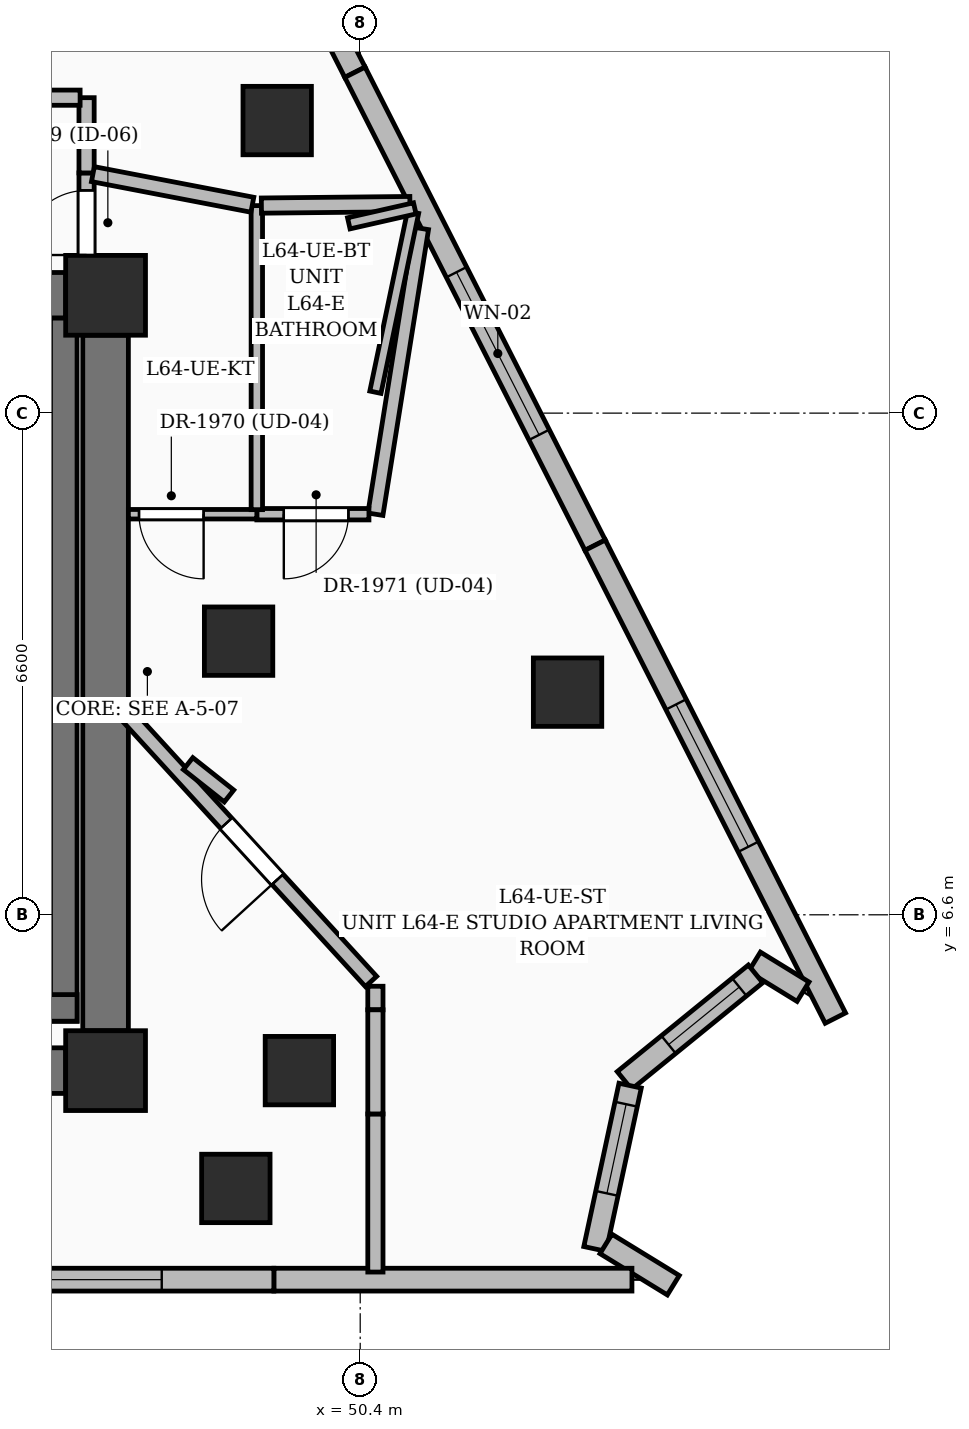
"""IFC4 building model, lengths in metres.
Left out: names, types, materials, properties, quantities, classifications, styles, units other than length and angle.
Written with IfcOpenShell. Run it as: python <this file> out.ifc"""

import sys

from ifc_helpers import new_model, si_unit, direction, frame, frame_2d, origin, origin_2d, place, context, subcontext, project, spatial, rectangle, extrude, element, fill, save


model = new_model("IFC4")
c1 = context("Model", 3, precision=1e-05, world=origin(), true_north=direction((0.0, 1.0)))
c2 = subcontext(c1, "Body", "Model", "MODEL_VIEW")
j1 = project(units=[si_unit("LENGTHUNIT", "METRE"), si_unit("PLANEANGLEUNIT", "RADIAN")], contexts=[c1])
p1 = place(None, origin())
s1 = spatial("IfcSite", under=j1, at=p1, CompositionType="ELEMENT")
p2 = place(p1, origin())
s2 = spatial("IfcBuilding", under=s1, at=p2, CompositionType="ELEMENT")
p3 = place(p2, frame((0.0, 0.0, 248.25)))
s3 = spatial("IfcBuildingStorey", under=s2, at=p3, CompositionType="ELEMENT", Elevation=248.25)
for number, where, z_axis, x_axis in (
    (1, (47.05, 4.55, 0.0), (0.0, 0.0, 1.0), (1.0, 0.0, 0.0)),
    (2, (47.05, 14.75, 0.0), (0.0, 0.0, 1.0), (1.0, 0.0, 0.0)),
):
    element("IfcColumn", number, at=place(p3, frame(where, z_axis=z_axis, x_axis=x_axis)), inside=s3, PredefinedType="COLUMN", context=c2, shape_type="SweptSolid", body=[
        extrude(rectangle(XDim=1.05, YDim=1.05, at=origin_2d()), origin(), (0.0, 0.0, 1.0), 3.75),
    ])
for number, where, z_axis, x_axis in (
    (3, (49.6, 4.55, 0.0), (0.0, 0.0, 1.0), (1.0, 0.0, 0.0)),
    (4, (48.8, 10.2, 0.0), (0.0, 0.0, 1.0), (1.0, 0.0, 0.0)),
):
    element("IfcColumn", number, at=place(p3, frame(where, z_axis=z_axis, x_axis=x_axis)), inside=s3, PredefinedType="COLUMN", context=c2, shape_type="SweptSolid", body=[
        extrude(rectangle(XDim=0.9, YDim=0.9, at=origin_2d()), origin(), (0.0, 0.0, 1.0), 3.75),
    ])
p4 = place(p3, frame((35.675, 4.55, 0.0), z_axis=(0.0, 0.0, 1.0), x_axis=(1.0, 0.0, 0.0)))
e5 = element("IfcWall", 5, at=p4, inside=s3, PredefinedType="SHEAR", context=c2, shape_type="SweptSolid", body=[
    extrude(rectangle(XDim=10.85, YDim=0.6, at=frame_2d((5.425, 0.0))), origin(), (0.0, 0.0, 1.0), 3.75),
])
p5 = place(p3, frame((35.675, 14.75, 0.0), z_axis=(0.0, 0.0, 1.0), x_axis=(1.0, 0.0, 0.0)))
e6 = element("IfcWall", 6, at=p5, inside=s3, PredefinedType="SHEAR", context=c2, shape_type="SweptSolid", body=[
    extrude(rectangle(XDim=10.85, YDim=0.6, at=frame_2d((5.425, 0.0))), origin(), (0.0, 0.0, 1.0), 3.75),
])
p6 = place(p5, frame((1.1, 0.0, 0.0)))
e7 = element("IfcOpeningElement", 7, at=p6, cuts=e6, PredefinedType="OPENING", context=c2, shape_type="SweptSolid", body=[
    extrude(rectangle(XDim=1.05, YDim=2.15, at=frame_2d((0.525, 1.075))), frame((0.0, 0.31, 0.0), z_axis=(0.0, -1.0, 0.0), x_axis=(1.0, 0.0, 0.0)), (0.0, 0.0, 1.0), 0.62),
])
p7 = place(p5, frame((8.7, 0.0, 0.0)))
e8 = element("IfcOpeningElement", 8, at=p7, cuts=e6, PredefinedType="OPENING", context=c2, shape_type="SweptSolid", body=[
    extrude(rectangle(XDim=1.05, YDim=2.15, at=frame_2d((0.525, 1.075))), frame((0.0, 0.31, 0.0), z_axis=(0.0, -1.0, 0.0), x_axis=(1.0, 0.0, 0.0)), (0.0, 0.0, 1.0), 0.62),
])
p8 = place(p5, frame((3.825, 0.0, 0.0)))
e9 = element("IfcOpeningElement", 9, at=p8, cuts=e6, PredefinedType="OPENING", context=c2, shape_type="SweptSolid", body=[
    extrude(rectangle(XDim=1.2, YDim=2.2, at=frame_2d((0.6, 1.1))), frame((0.0, 0.31, 0.0), z_axis=(0.0, -1.0, 0.0), x_axis=(1.0, 0.0, 0.0)), (0.0, 0.0, 1.0), 0.62),
])
p9 = place(p5, frame((5.825, 0.0, 0.0)))
e10 = element("IfcOpeningElement", 10, at=p9, cuts=e6, PredefinedType="OPENING", context=c2, shape_type="SweptSolid", body=[
    extrude(rectangle(XDim=1.2, YDim=2.2, at=frame_2d((0.6, 1.1))), frame((0.0, 0.31, 0.0), z_axis=(0.0, -1.0, 0.0), x_axis=(1.0, 0.0, 0.0)), (0.0, 0.0, 1.0), 0.62),
])
p10 = place(p3, frame((47.05, 5.075, 0.0), z_axis=(0.0, 0.0, 1.0), x_axis=(0.0, 1.0, 0.0)))
e11 = element("IfcWall", 11, at=p10, inside=s3, PredefinedType="SHEAR", context=c2, shape_type="SweptSolid", body=[
    extrude(rectangle(XDim=9.15, YDim=0.6, at=frame_2d((4.575, 0.0))), origin(), (0.0, 0.0, 1.0), 3.75),
])
p11 = place(p3, frame((46.5, 5.2, 0.0), z_axis=(0.0, 0.0, 1.0), x_axis=(0.0, 1.0, 0.0)))
e12 = element("IfcWall", 12, at=p11, inside=s3, PredefinedType="SOLIDWALL", context=c2, shape_type="SweptSolid", body=[
    extrude(rectangle(XDim=9.25, YDim=0.35, at=frame_2d((4.625, 0.0))), origin(), (0.0, 0.0, 1.0), 3.75),
])
p12 = place(p3, frame((43.125, 5.375, 0.0), z_axis=(0.0, 0.0, 1.0), x_axis=(1.0, 0.0, 0.0)))
e13 = element("IfcWall", 13, at=p12, inside=s3, PredefinedType="SOLIDWALL", context=c2, shape_type="SweptSolid", body=[
    extrude(rectangle(XDim=3.55, YDim=0.35, at=frame_2d((1.775, 0.0))), origin(), (0.0, 0.0, 1.0), 3.75),
])
for number, where, z_axis, x_axis in (
    (14, (48.764, 3.0, 0.0), (0.0, 0.0, 1.0), (1.0, 0.0, 0.0)),
    (15, (53.128, 9.529, 0.0), (0.0, 0.0, 1.0), (1.0, 0.0, 0.0)),
    (16, (49.308, 17.049, 0.0), (0.0, 0.0, 1.0), (1.0, 0.0, 0.0)),
):
    element("IfcColumn", number, at=place(p3, frame(where, z_axis=z_axis, x_axis=x_axis)), inside=s3, PredefinedType="COLUMN", context=c2, shape_type="SweptSolid", body=[
        extrude(rectangle(XDim=0.9, YDim=0.9, at=origin_2d()), origin(), (0.0, 0.0, 1.0), 3.75),
    ])
p13 = place(p3, frame((47.297, 23.656, 0.0), z_axis=(0.0, 0.0, 1.0), x_axis=(0.452876034441, -0.891573495248, 0.0)))
e17 = element("IfcWall", 17, at=p13, inside=s3, PredefinedType="SOLIDWALL", context=c2, shape_type="SweptSolid", body=[
    extrude(rectangle(XDim=6.698, YDim=0.3, at=frame_2d((3.349, 0.0))), origin(), (0.0, 0.0, 1.0), 3.5),
])
p14 = place(p13, frame((2.645, 0.0, 0.8)))
e18 = element("IfcOpeningElement", 18, at=p14, cuts=e17, PredefinedType="OPENING", context=c2, shape_type="SweptSolid", body=[
    extrude(rectangle(XDim=1.2, YDim=1.8, at=frame_2d((0.6, 0.9))), frame((0.0, 0.16, 0.0), z_axis=(0.0, -1.0, 0.0), x_axis=(1.0, 0.0, 0.0)), (0.0, 0.0, 1.0), 0.32),
])
p15 = place(p3, frame((50.331, 17.684, 0.0), z_axis=(0.0, 0.0, 1.0), x_axis=(0.452886204096, -0.891568329484, 0.0)))
e19 = element("IfcWall", 19, at=p15, inside=s3, PredefinedType="SOLIDWALL", context=c2, shape_type="SweptSolid", body=[
    extrude(rectangle(XDim=6.978, YDim=0.3, at=frame_2d((3.489, 0.0))), origin(), (0.0, 0.0, 1.0), 3.5),
])
p16 = place(p15, frame((2.95, 0.0, 0.6)))
e20 = element("IfcOpeningElement", 20, at=p16, cuts=e19, PredefinedType="OPENING", context=c2, shape_type="SweptSolid", body=[
    extrude(rectangle(XDim=2.4, YDim=2.1, at=frame_2d((1.2, 1.05))), frame((0.0, 0.16, 0.0), z_axis=(0.0, -1.0, 0.0), x_axis=(1.0, 0.0, 0.0)), (0.0, 0.0, 1.0), 0.32),
])
p17 = place(p3, frame((53.491, 11.463, 0.0), z_axis=(0.0, 0.0, 1.0), x_axis=(0.452872520075, -0.891575280367, 0.0)))
e21 = element("IfcWall", 21, at=p17, inside=s3, PredefinedType="SOLIDWALL", context=c2, shape_type="SweptSolid", body=[
    extrude(rectangle(XDim=6.978, YDim=0.3, at=frame_2d((3.489, 0.0))), origin(), (0.0, 0.0, 1.0), 3.5),
])
p18 = place(p17, frame((2.35, 0.0, 0.55)))
e22 = element("IfcOpeningElement", 22, at=p18, cuts=e21, PredefinedType="OPENING", context=c2, shape_type="SweptSolid", body=[
    extrude(rectangle(XDim=2.1, YDim=2.4, at=frame_2d((1.05, 1.2))), frame((0.0, 0.16, 0.0), z_axis=(0.0, -1.0, 0.0), x_axis=(1.0, 0.0, 0.0)), (0.0, 0.0, 1.0), 0.32),
])
p19 = place(p3, frame((56.226, 5.588, 0.0), z_axis=(0.0, 0.0, 1.0), x_axis=(-0.851959856167, 0.523607107935, 0.0)))
e23 = element("IfcWall", 23, at=p19, inside=s3, PredefinedType="SOLIDWALL", context=c2, shape_type="SweptSolid", body=[
    extrude(rectangle(XDim=0.75, YDim=0.3, at=frame_2d((0.375, 0.0))), origin(), (0.0, 0.0, 1.0), 3.5),
])
p20 = place(p3, frame((55.601, 5.823, 0.0), z_axis=(0.0, 0.0, 1.0), x_axis=(-0.775969517168, -0.630770408648, 0.0)))
e24 = element("IfcWall", 24, at=p20, inside=s3, PredefinedType="SOLIDWALL", context=c2, shape_type="SweptSolid", body=[
    extrude(rectangle(XDim=2.223, YDim=0.3, at=frame_2d((1.111, 0.0))), origin(), (0.0, 0.0, 1.0), 3.5),
])
p21 = place(p20, frame((0.275, 0.0, 0.8)))
e25 = element("IfcOpeningElement", 25, at=p21, cuts=e24, PredefinedType="OPENING", context=c2, shape_type="SweptSolid", body=[
    extrude(rectangle(XDim=1.2, YDim=1.8, at=frame_2d((0.6, 0.9))), frame((0.0, 0.16, 0.0), z_axis=(0.0, -1.0, 0.0), x_axis=(1.0, 0.0, 0.0)), (0.0, 0.0, 1.0), 0.32),
])
p22 = place(p3, frame((53.951, 4.353, 0.0), z_axis=(0.0, 0.0, 1.0), x_axis=(-0.210621406129, -0.977567707773, 0.0)))
e26 = element("IfcWall", 26, at=p22, inside=s3, PredefinedType="SOLIDWALL", context=c2, shape_type="SweptSolid", body=[
    extrude(rectangle(XDim=2.198, YDim=0.3, at=frame_2d((1.099, 0.0))), origin(), (0.0, 0.0, 1.0), 3.5),
])
p23 = place(p22, frame((0.25, 0.0, 0.8)))
e27 = element("IfcOpeningElement", 27, at=p23, cuts=e26, PredefinedType="OPENING", context=c2, shape_type="SweptSolid", body=[
    extrude(rectangle(XDim=1.2, YDim=1.8, at=frame_2d((0.6, 0.9))), frame((0.0, 0.16, 0.0), z_axis=(0.0, -1.0, 0.0), x_axis=(1.0, 0.0, 0.0)), (0.0, 0.0, 1.0), 0.32),
])
p24 = place(p3, frame((53.633, 2.271, 0.0), z_axis=(0.0, 0.0, 1.0), x_axis=(0.852375061926, -0.522930926421, 0.0)))
e28 = element("IfcWall", 28, at=p24, inside=s3, PredefinedType="SOLIDWALL", context=c2, shape_type="SweptSolid", body=[
    extrude(rectangle(XDim=1.04, YDim=0.3, at=frame_2d((0.52, 0.0))), origin(), (0.0, 0.0, 1.0), 3.5),
])
p25 = place(p3, frame((53.975, 1.8, 0.0), z_axis=(0.0, 0.0, 1.0), x_axis=(-1.0, 0.0, 0.0)))
e29 = element("IfcWall", 29, at=p25, inside=s3, PredefinedType="SOLIDWALL", context=c2, shape_type="SweptSolid", body=[
    extrude(rectangle(XDim=4.711, YDim=0.3, at=frame_2d((2.355, 0.0))), origin(), (0.0, 0.0, 1.0), 3.5),
])
p26 = place(p3, frame((49.264, 1.8, 0.0), z_axis=(0.0, 0.0, 1.0), x_axis=(-1.0, 0.0, 0.0)))
e30 = element("IfcWall", 30, at=p26, inside=s3, PredefinedType="SOLIDWALL", context=c2, shape_type="SweptSolid", body=[
    extrude(rectangle(XDim=5.276, YDim=0.3, at=frame_2d((2.638, 0.0))), origin(), (0.0, 0.0, 1.0), 3.5),
])
p27 = place(p26, frame((1.475, 0.0, 0.55)))
e31 = element("IfcOpeningElement", 31, at=p27, cuts=e30, PredefinedType="OPENING", context=c2, shape_type="SweptSolid", body=[
    extrude(rectangle(XDim=2.1, YDim=2.4, at=frame_2d((1.05, 1.2))), frame((0.0, 0.16, 0.0), z_axis=(0.0, -1.0, 0.0), x_axis=(1.0, 0.0, 0.0)), (0.0, 0.0, 1.0), 0.32),
])
p28 = place(p3, frame((46.8, 15.05, 0.0), z_axis=(0.0, 0.0, 1.0), x_axis=(0.0, 1.0, 0.0)))
e32 = element("IfcWall", 32, at=p28, inside=s3, PredefinedType="PARTITIONING", context=c2, shape_type="SweptSolid", body=[
    extrude(rectangle(XDim=1.31, YDim=0.2, at=frame_2d((0.655, 0.0))), origin(), (0.0, 0.0, 1.0), 2.685),
])
p29 = place(p28, frame((0.23, 0.0, 0.0)))
e33 = element("IfcOpeningElement", 33, at=p29, cuts=e32, PredefinedType="OPENING", context=c2, shape_type="SweptSolid", body=[
    extrude(rectangle(XDim=0.85, YDim=2.1, at=frame_2d((0.425, 1.05))), frame((0.0, 0.11, 0.0), z_axis=(0.0, -1.0, 0.0), x_axis=(1.0, 0.0, 0.0)), (0.0, 0.0, 1.0), 0.22),
])
p30 = place(p3, frame((46.8, 16.36, 0.0), z_axis=(0.0, 0.0, 1.0), x_axis=(0.0, 1.0, 0.0)))
e34 = element("IfcWall", 34, at=p30, inside=s3, PredefinedType="PARTITIONING", context=c2, shape_type="SweptSolid", body=[
    extrude(rectangle(XDim=0.99, YDim=0.2, at=frame_2d((0.495, 0.0))), origin(), (0.0, 0.0, 1.0), 3.5),
])
p31 = place(p3, frame((46.715, 17.35, 0.0), z_axis=(0.0, 0.0, 1.0), x_axis=(-1.0, 0.0, 0.0)))
e35 = element("IfcWall", 35, at=p31, inside=s3, PredefinedType="PARTITIONING", context=c2, shape_type="SweptSolid", body=[
    extrude(rectangle(XDim=5.105, YDim=0.2, at=frame_2d((2.552, 0.0))), origin(), (0.0, 0.0, 1.0), 2.685),
])
p32 = place(p31, frame((1.951, 0.0, 0.0)))
e36 = element("IfcOpeningElement", 36, at=p32, cuts=e35, PredefinedType="OPENING", context=c2, shape_type="SweptSolid", body=[
    extrude(rectangle(XDim=1.0, YDim=2.2, at=frame_2d((0.5, 1.1))), frame((0.0, 0.11, 0.0), z_axis=(0.0, -1.0, 0.0), x_axis=(1.0, 0.0, 0.0)), (0.0, 0.0, 1.0), 0.22),
])
p33 = place(p3, frame((50.6, 1.9, 0.0), z_axis=(0.0, 0.0, 1.0), x_axis=(0.0, 1.0, 0.0)))
e37 = element("IfcWall", 37, at=p33, inside=s3, PredefinedType="PARTITIONING", context=c2, shape_type="SweptSolid", body=[
    extrude(rectangle(XDim=2.08, YDim=0.2, at=frame_2d((1.04, 0.0))), origin(), (0.0, 0.0, 1.0), 3.5),
])
p34 = place(p3, frame((50.6, 5.35, 0.0), z_axis=(0.0, 0.0, 1.0), x_axis=(0.0, 1.0, 0.0)))
e38 = element("IfcWall", 38, at=p34, inside=s3, PredefinedType="PARTITIONING", context=c2, shape_type="SweptSolid", body=[
    extrude(rectangle(XDim=0.31, YDim=0.2, at=frame_2d((0.155, 0.0))), origin(), (0.0, 0.0, 1.0), 2.82),
])
p35 = place(p3, frame((50.6, 3.98, 0.0), z_axis=(0.0, 0.0, 1.0), x_axis=(0.0, 1.0, 0.0)))
e39 = element("IfcWall", 39, at=p35, inside=s3, PredefinedType="PARTITIONING", context=c2, shape_type="SweptSolid", body=[
    extrude(rectangle(XDim=1.37, YDim=0.2, at=frame_2d((0.685, 0.0))), origin(), (0.0, 0.0, 1.0), 2.82),
])
p36 = place(p3, frame((50.542, 5.723, 0.0), z_axis=(0.0, 0.0, 1.0), x_axis=(-0.67522874339, 0.737608394814, 0.0)))
e40 = element("IfcWall", 40, at=p36, inside=s3, PredefinedType="PARTITIONING", context=c2, shape_type="SweptSolid", body=[
    extrude(rectangle(XDim=4.728, YDim=0.2, at=frame_2d((2.364, 0.0))), origin(), (0.0, 0.0, 1.0), 2.685),
])
p37 = place(p36, frame((1.822, 0.0, 0.0)))
e41 = element("IfcOpeningElement", 41, at=p37, cuts=e40, PredefinedType="OPENING", context=c2, shape_type="SweptSolid", body=[
    extrude(rectangle(XDim=1.0, YDim=2.2, at=frame_2d((0.5, 1.1))), frame((0.0, 0.11, 0.0), z_axis=(0.0, -1.0, 0.0), x_axis=(1.0, 0.0, 0.0)), (0.0, 0.0, 1.0), 0.22),
])
p38 = place(p3, frame((51.2, 15.63, 0.0), z_axis=(0.0, 0.0, 1.0), x_axis=(-0.157552821355, -0.987510561201, 0.0)))
e42 = element("IfcWall", 42, at=p38, inside=s3, PredefinedType="PARTITIONING", context=c2, shape_type="SweptSolid", body=[
    extrude(rectangle(XDim=3.807, YDim=0.2, at=frame_2d((1.904, 0.0))), origin(), (0.0, 0.0, 1.0), 2.82),
])
p39 = place(p3, frame((50.515, 11.87, 0.0), z_axis=(0.0, 0.0, 1.0), x_axis=(-1.0, 0.0, 0.0)))
e43 = element("IfcWall", 43, at=p39, inside=s3, PredefinedType="PARTITIONING", context=c2, shape_type="SweptSolid", body=[
    extrude(rectangle(XDim=1.475, YDim=0.15, at=frame_2d((0.737, 0.0))), origin(), (0.0, 0.0, 1.0), 3.5),
])
p40 = place(p39, frame((0.27, 0.0, 0.0)))
e44 = element("IfcOpeningElement", 44, at=p40, cuts=e43, PredefinedType="OPENING", context=c2, shape_type="SweptSolid", body=[
    extrude(rectangle(XDim=0.85, YDim=2.1, at=frame_2d((0.425, 1.05))), frame((0.0, 0.085, 0.0), z_axis=(0.0, -1.0, 0.0), x_axis=(1.0, 0.0, 0.0)), (0.0, 0.0, 1.0), 0.17),
])
p41 = place(p3, frame((49.04, 11.87, 0.0), z_axis=(0.0, 0.0, 1.0), x_axis=(-1.0, 0.0, 0.0)))
e45 = element("IfcWall", 45, at=p41, inside=s3, PredefinedType="PARTITIONING", context=c2, shape_type="SweptSolid", body=[
    extrude(rectangle(XDim=1.69, YDim=0.125, at=frame_2d((0.845, 0.0))), origin(), (0.0, 0.0, 1.0), 3.5),
])
p42 = place(p41, frame((0.7, 0.0, 0.0)))
e46 = element("IfcOpeningElement", 46, at=p42, cuts=e45, PredefinedType="OPENING", context=c2, shape_type="SweptSolid", body=[
    extrude(rectangle(XDim=0.85, YDim=2.1, at=frame_2d((0.425, 1.05))), frame((0.0, 0.072, 0.0), z_axis=(0.0, -1.0, 0.0), x_axis=(1.0, 0.0, 0.0)), (0.0, 0.0, 1.0), 0.145),
])
p43 = place(p3, frame((49.04, 15.93, 0.0), z_axis=(0.0, 0.0, 1.0), x_axis=(0.0, -1.0, 0.0)))
e47 = element("IfcWall", 47, at=p43, inside=s3, PredefinedType="PARTITIONING", context=c2, shape_type="SweptSolid", body=[
    extrude(rectangle(XDim=4.0, YDim=0.15, at=frame_2d((2.0, 0.0))), origin(), (0.0, 0.0, 1.0), 3.5),
])
p44 = place(p3, frame((51.054, 15.95, 0.0), z_axis=(0.0, 0.0, 1.0), x_axis=(-0.999947512259, -0.010245619893, 0.0)))
e48 = element("IfcWall", 48, at=p44, inside=s3, PredefinedType="PARTITIONING", context=c2, shape_type="SweptSolid", body=[
    extrude(rectangle(XDim=1.954, YDim=0.2, at=frame_2d((0.977, 0.0))), origin(), (0.0, 0.0, 1.0), 2.82),
])
p45 = place(p3, frame((48.981, 15.941, 0.0), z_axis=(0.0, 0.0, 1.0), x_axis=(-0.982076492774, 0.188482790571, 0.0)))
e49 = element("IfcWall", 49, at=p45, inside=s3, PredefinedType="PARTITIONING", context=c2, shape_type="SweptSolid", body=[
    extrude(rectangle(XDim=2.136, YDim=0.2, at=frame_2d((1.068, 0.0))), origin(), (0.0, 0.0, 1.0), 3.5),
])
p46 = place(p3, frame((48.674, 8.163, 0.0), z_axis=(0.0, 0.0, 1.0), x_axis=(-0.784016970821, 0.620739389329, 0.0)))
e50 = element("IfcWall", 50, at=p46, inside=s3, PredefinedType="PARTITIONING", context=c2, shape_type="SweptSolid", body=[
    extrude(rectangle(XDim=0.686, YDim=0.2, at=frame_2d((0.343, 0.0))), origin(), (0.0, 0.0, 1.0), 2.685),
])
p47 = place(p3, frame((50.6, 13.475, 0.0), z_axis=(0.0, 0.0, 1.0), x_axis=(0.204860905719, 0.978791095846, 0.0)))
e51 = element("IfcWall", 51, at=p47, inside=s3, PredefinedType="PARTITIONING", context=c2, shape_type="SweptSolid", body=[
    extrude(rectangle(XDim=2.419, YDim=0.15, at=frame_2d((1.209, 0.0))), origin(), (0.0, 0.0, 1.0), 2.82),
])
p48 = place(p3, frame((51.118, 15.894, 0.0), z_axis=(0.0, 0.0, 1.0), x_axis=(-0.975189411554, -0.221372111146, 0.0)))
e52 = element("IfcWall", 52, at=p48, inside=s3, PredefinedType="PARTITIONING", context=c2, shape_type="SweptSolid", body=[
    extrude(rectangle(XDim=0.89, YDim=0.15, at=frame_2d((0.445, 0.0))), origin(), (0.0, 0.0, 1.0), 2.82),
])
p49 = place(p16, origin())
e53 = element("IfcWindow", 53, at=p49, inside=s3, PartitioningType="SINGLE_PANEL", PredefinedType="WINDOW", context=c2, shape_type="SweptSolid", body=[
    extrude(rectangle(XDim=2.4, YDim=2.1, at=frame_2d((1.2, 1.05))), frame((0.0, 0.03, 0.0), z_axis=(0.0, -1.0, 0.0), x_axis=(1.0, 0.0, 0.0)), (0.0, 0.0, 1.0), 0.06),
])
fill(e20, e53)
p50 = place(p18, origin())
e54 = element("IfcWindow", 54, at=p50, inside=s3, PartitioningType="SINGLE_PANEL", PredefinedType="WINDOW", context=c2, shape_type="SweptSolid", body=[
    extrude(rectangle(XDim=2.1, YDim=2.4, at=frame_2d((1.05, 1.2))), frame((0.0, 0.03, 0.0), z_axis=(0.0, -1.0, 0.0), x_axis=(1.0, 0.0, 0.0)), (0.0, 0.0, 1.0), 0.06),
])
fill(e22, e54)
p51 = place(p21, origin())
e55 = element("IfcWindow", 55, at=p51, inside=s3, PartitioningType="SINGLE_PANEL", PredefinedType="WINDOW", context=c2, shape_type="SweptSolid", body=[
    extrude(rectangle(XDim=1.2, YDim=1.8, at=frame_2d((0.6, 0.9))), frame((0.0, 0.03, 0.0), z_axis=(0.0, -1.0, 0.0), x_axis=(1.0, 0.0, 0.0)), (0.0, 0.0, 1.0), 0.06),
])
fill(e25, e55)
p52 = place(p23, origin())
e56 = element("IfcWindow", 56, at=p52, inside=s3, PartitioningType="SINGLE_PANEL", PredefinedType="WINDOW", context=c2, shape_type="SweptSolid", body=[
    extrude(rectangle(XDim=1.2, YDim=1.8, at=frame_2d((0.6, 0.9))), frame((0.0, 0.03, 0.0), z_axis=(0.0, -1.0, 0.0), x_axis=(1.0, 0.0, 0.0)), (0.0, 0.0, 1.0), 0.06),
])
fill(e27, e56)
p53 = place(p27, origin())
e57 = element("IfcWindow", 57, at=p53, inside=s3, PartitioningType="SINGLE_PANEL", PredefinedType="WINDOW", context=c2, shape_type="SweptSolid", body=[
    extrude(rectangle(XDim=2.1, YDim=2.4, at=frame_2d((1.05, 1.2))), frame((0.0, 0.03, 0.0), z_axis=(0.0, -1.0, 0.0), x_axis=(1.0, 0.0, 0.0)), (0.0, 0.0, 1.0), 0.06),
])
fill(e31, e57)
p54 = place(p29, origin())
e58 = element("IfcDoor", 58, at=p54, inside=s3, OperationType="SINGLE_SWING_LEFT", PredefinedType="DOOR", context=c2, shape_type="SweptSolid", body=[
    extrude(rectangle(XDim=0.85, YDim=2.1, at=frame_2d((0.425, 1.05))), frame((0.0, 0.025, 0.0), z_axis=(0.0, -1.0, 0.0), x_axis=(1.0, 0.0, 0.0)), (0.0, 0.0, 1.0), 0.05),
])
fill(e33, e58)
p55 = place(p42, origin())
e59 = element("IfcDoor", 59, at=p55, inside=s3, OperationType="SINGLE_SWING_LEFT", PredefinedType="DOOR", context=c2, shape_type="SweptSolid", body=[
    extrude(rectangle(XDim=0.85, YDim=2.1, at=frame_2d((0.425, 1.05))), frame((0.0, 0.025, 0.0), z_axis=(0.0, -1.0, 0.0), x_axis=(1.0, 0.0, 0.0)), (0.0, 0.0, 1.0), 0.05),
])
fill(e46, e59)
p56 = place(p40, origin())
e60 = element("IfcDoor", 60, at=p56, inside=s3, OperationType="SINGLE_SWING_RIGHT", PredefinedType="DOOR", context=c2, shape_type="SweptSolid", body=[
    extrude(rectangle(XDim=0.85, YDim=2.1, at=frame_2d((0.425, 1.05))), frame((0.0, 0.025, 0.0), z_axis=(0.0, -1.0, 0.0), x_axis=(1.0, 0.0, 0.0)), (0.0, 0.0, 1.0), 0.05),
])
fill(e44, e60)
p57 = place(p37, origin())
e61 = element("IfcDoor", 61, at=p57, inside=s3, OperationType="SINGLE_SWING_LEFT", PredefinedType="DOOR", context=c2, shape_type="SweptSolid", body=[
    extrude(rectangle(XDim=1.0, YDim=2.2, at=frame_2d((0.5, 1.1))), frame((0.0, 0.025, 0.0), z_axis=(0.0, -1.0, 0.0), x_axis=(1.0, 0.0, 0.0)), (0.0, 0.0, 1.0), 0.05),
])
fill(e41, e61)
save(model, sys.argv[1])
